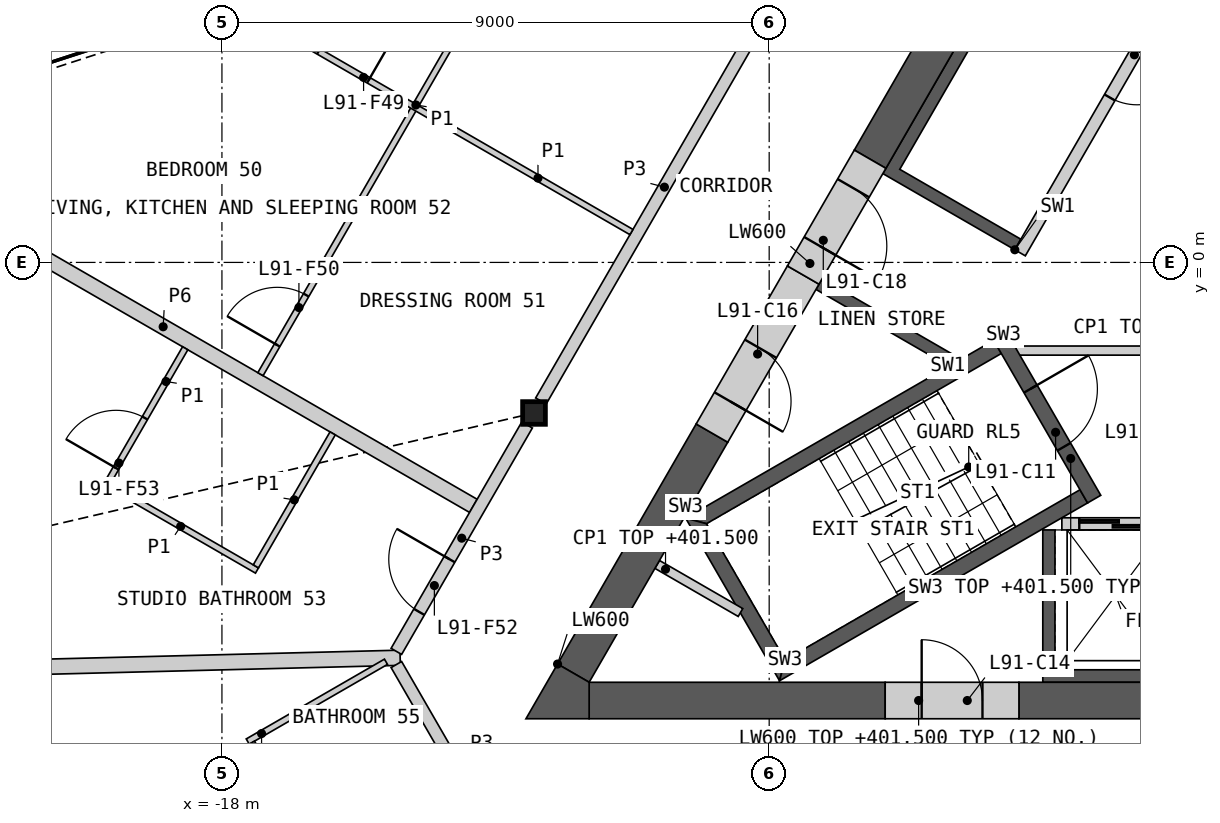
"""IFC4 building model, lengths in metres.
Left out: names, types, materials, properties, quantities, classifications, styles, units other than length and angle.
Written with IfcOpenShell. Run it as: python <this file> out.ifc"""

import sys

from ifc_helpers import new_model, si_unit, direction, frame, frame_2d, origin, origin_2d, place, context, subcontext, project, spatial, polyline, rectangle, i_section, outline, extrude, element, fill, save


model = new_model("IFC4")
c1 = context("Model", 3, precision=1e-05, world=origin(), true_north=direction((0.0, 1.0)))
c2 = subcontext(c1, "Body", "Model", "MODEL_VIEW")
j1 = project(units=[si_unit("LENGTHUNIT", "METRE"), si_unit("PLANEANGLEUNIT", "RADIAN")], contexts=[c1])
p1 = place(None, origin())
s1 = spatial("IfcSite", under=j1, at=p1, CompositionType="ELEMENT")
p2 = place(p1, origin())
s2 = spatial("IfcBuilding", under=s1, at=p2, CompositionType="ELEMENT")
p3 = place(p2, frame((0.0, 0.0, 398.4)))
s3 = spatial("IfcBuildingStorey", under=s2, at=p3, CompositionType="ELEMENT", Elevation=398.4)
p4 = place(p3, frame((-12.868, -2.476, 0.0), z_axis=(0.0, 0.0, 1.0), x_axis=(1.0, 0.0, 0.0)))
e1 = element("IfcColumn", 1, at=p4, inside=s3, PredefinedType="COLUMN", context=c2, shape_type="SweptSolid", body=[
    extrude(i_section(OverallWidth=0.374, OverallDepth=0.372, WebThickness=0.016, FlangeThickness=0.026, at=origin_2d()), origin(), (0.0, 0.0, 1.0), 3.4),
])
p5 = place(p3, origin())
e2 = element("IfcWall", 2, at=p5, inside=s3, PredefinedType="SHEAR", context=c2, shape_type="SweptSolid", body=[
    extrude(outline(polyline([(4.5, -4.4), (4.5, -6.906), (-4.5, -6.906), (-4.5, -4.4), (-4.3, -4.4), (-4.3, -6.7), (-2.3, -6.7), (-2.3, -4.4), (-2.1, -4.4), (-2.1, -6.7), (-0.1, -6.7), (-0.1, -4.4), (0.1, -4.4), (0.1, -6.7), (2.1, -6.7), (2.1, -4.4), (2.3, -4.4), (2.3, -6.7), (4.3, -6.7), (4.3, -4.4), (4.5, -4.4)])), origin(), (0.0, 0.0, 1.0), 3.1),
])
p6 = place(p3, frame((-4.187, -4.3, 0.0), z_axis=(0.0, 0.0, 1.0), x_axis=(1.0, 0.0, 0.0)))
e3 = element("IfcWall", 3, at=p6, inside=s3, PredefinedType="SOLIDWALL", context=c2, shape_type="SweptSolid", body=[
    extrude(rectangle(XDim=8.373, YDim=0.2, at=frame_2d((4.187, 0.0))), origin(), (0.0, 0.0, 1.0), 3.1),
])
p7 = place(p6, frame((0.287, 0.0, 0.0)))
e4 = element("IfcOpeningElement", 4, at=p7, cuts=e3, PredefinedType="OPENING", context=c2, shape_type="SweptSolid", body=[
    extrude(rectangle(XDim=1.2, YDim=2.1, at=frame_2d((0.6, 1.05))), frame((0.0, 0.11, 0.0), z_axis=(0.0, -1.0, 0.0), x_axis=(1.0, 0.0, 0.0)), (0.0, 0.0, 1.0), 0.22),
])
p8 = place(p6, frame((2.387, 0.0, 0.0)))
e5 = element("IfcOpeningElement", 5, at=p8, cuts=e3, PredefinedType="OPENING", context=c2, shape_type="SweptSolid", body=[
    extrude(rectangle(XDim=1.4, YDim=2.1, at=frame_2d((0.7, 1.05))), frame((0.0, 0.11, 0.0), z_axis=(0.0, -1.0, 0.0), x_axis=(1.0, 0.0, 0.0)), (0.0, 0.0, 1.0), 0.22),
])
p9 = place(p6, frame((4.737, 0.0, 0.0)))
e6 = element("IfcOpeningElement", 6, at=p9, cuts=e3, PredefinedType="OPENING", context=c2, shape_type="SweptSolid", body=[
    extrude(rectangle(XDim=1.1, YDim=2.1, at=frame_2d((0.55, 1.05))), frame((0.0, 0.11, 0.0), z_axis=(0.0, -1.0, 0.0), x_axis=(1.0, 0.0, 0.0)), (0.0, 0.0, 1.0), 0.22),
])
p10 = place(p6, frame((6.887, 0.0, 0.0)))
e7 = element("IfcOpeningElement", 7, at=p10, cuts=e3, PredefinedType="OPENING", context=c2, shape_type="SweptSolid", body=[
    extrude(rectangle(XDim=1.2, YDim=2.1, at=frame_2d((0.6, 1.05))), frame((0.0, 0.11, 0.0), z_axis=(0.0, -1.0, 0.0), x_axis=(1.0, 0.0, 0.0)), (0.0, 0.0, 1.0), 0.22),
])
p11 = place(p3, origin())
e8 = element("IfcWall", 8, at=p11, inside=s3, PredefinedType="SHEAR", context=c2, shape_type="SweptSolid", body=[
    extrude(outline(polyline([(-6.061, -1.697), (-8.231, -0.444), (-8.131, -0.271), (-5.96, -1.524), (-6.061, -1.697)])), origin(), (0.0, 0.0, 1.0), 3.1),
])
p12 = place(p3, origin())
e9 = element("IfcWall", 9, at=p12, inside=s3, PredefinedType="SHEAR", context=c2, shape_type="SweptSolid", body=[
    extrude(outline(polyline([(-4.96, 0.208), (-7.131, 1.461), (-3.731, 7.35), (-1.561, 6.097), (-1.66, 5.924), (-3.652, 7.074), (-6.852, 1.531), (-4.861, 0.381), (-4.96, 0.208)])), origin(), (0.0, 0.0, 1.0), 3.1),
])
p13 = place(p3, frame((-1.631, 5.776, 0.0), z_axis=(0.0, 0.0, 1.0), x_axis=(-0.499992876559, -0.866029516466, 0.0)))
e10 = element("IfcWall", 10, at=p13, inside=s3, PredefinedType="SOLIDWALL", context=c2, shape_type="SweptSolid", body=[
    extrude(rectangle(XDim=6.486, YDim=0.2, at=frame_2d((3.243, 0.0))), origin(), (0.0, 0.0, 1.0), 3.1),
])
p14 = place(p13, frame((2.637, 0.0, 0.0)))
e11 = element("IfcOpeningElement", 11, at=p14, cuts=e10, PredefinedType="OPENING", context=c2, shape_type="SweptSolid", body=[
    extrude(rectangle(XDim=0.9, YDim=2.1, at=frame_2d((0.45, 1.05))), frame((0.0, 0.11, 0.0), z_axis=(0.0, -1.0, 0.0), x_axis=(1.0, 0.0, 0.0)), (0.0, 0.0, 1.0), 0.22),
])
p15 = place(p3, frame((-4.941, -1.45, 0.0), z_axis=(0.0, 0.0, 1.0), x_axis=(1.0, 0.0, 0.0)))
e12 = element("IfcWall", 12, at=p15, inside=s3, PredefinedType="PARTITIONING", context=c2, shape_type="SweptSolid", body=[
    extrude(rectangle(XDim=9.882, YDim=0.15, at=frame_2d((4.941, 0.0))), origin(), (0.0, 0.0, 1.0), 3.1),
])
p16 = place(p15, frame((4.391, 0.0, 0.0)))
e13 = element("IfcOpeningElement", 13, at=p16, cuts=e12, PredefinedType="OPENING", context=c2, shape_type="SweptSolid", body=[
    extrude(rectangle(XDim=1.1, YDim=2.1, at=frame_2d((0.55, 1.05))), frame((0.0, 0.085, 0.0), z_axis=(0.0, -1.0, 0.0), x_axis=(1.0, 0.0, 0.0)), (0.0, 0.0, 1.0), 0.17),
])
p17 = place(p3, origin())
e14 = element("IfcWall", 14, at=p17, inside=s3, PredefinedType="SHEAR", context=c2, shape_type="SweptSolid", body=[
    extrude(outline(polyline([(-5.307, -1.281), (-10.374, -4.206), (-10.032, -4.298), (-5.182, -1.498), (-5.307, -1.281)])), origin(), (0.0, 0.0, 1.0), 3.1),
])
p18 = place(p3, origin())
e15 = element("IfcWall", 15, at=p18, inside=s3, PredefinedType="SHEAR", context=c2, shape_type="SweptSolid", body=[
    extrude(outline(polyline([(-10.374, -4.206), (-8.83, -6.881), (-8.738, -6.539), (-10.032, -4.298), (-10.374, -4.206)])), origin(), (0.0, 0.0, 1.0), 3.1),
])
p19 = place(p3, origin())
e16 = element("IfcWall", 16, at=p19, inside=s3, PredefinedType="SHEAR", context=c2, shape_type="SweptSolid", body=[
    extrude(outline(polyline([(-8.738, -6.539), (-8.83, -6.881), (-3.763, -3.956), (-3.888, -3.739), (-8.738, -6.539)])), origin(), (0.0, 0.0, 1.0), 3.1),
])
p20 = place(p3, frame((-5.199, -1.219, 0.0), z_axis=(0.0, 0.0, 1.0), x_axis=(0.499982516597, -0.866035497597, 0.0)))
e17 = element("IfcWall", 17, at=p20, inside=s3, PredefinedType="SHEAR", context=c2, shape_type="SweptSolid", body=[
    extrude(rectangle(XDim=3.088, YDim=0.25, at=frame_2d((1.544, 0.0))), origin(), (0.0, 0.0, 1.0), 3.1),
])
p21 = place(p20, frame((0.994, 0.0, 0.0)))
e18 = element("IfcOpeningElement", 18, at=p21, cuts=e17, PredefinedType="OPENING", context=c2, shape_type="SweptSolid", body=[
    extrude(rectangle(XDim=1.1, YDim=2.1, at=frame_2d((0.55, 1.05))), frame((0.0, 0.135, 0.0), z_axis=(0.0, -1.0, 0.0), x_axis=(1.0, 0.0, 0.0)), (0.0, 0.0, 1.0), 0.27),
])
p22 = place(p3, frame((-10.842, -4.967, 0.0), z_axis=(0.0, 0.0, 1.0), x_axis=(0.866098216386, -0.499873863663, 0.0)))
e19 = element("IfcWall", 19, at=p22, inside=s3, PredefinedType="PARTITIONING", context=c2, shape_type="SweptSolid", body=[
    extrude(rectangle(XDim=1.582, YDim=0.15, at=frame_2d((0.791, 0.0))), origin(), (0.0, 0.0, 1.0), 3.1),
])
p23 = place(p3, frame((-4.892, -7.206, 0.0), z_axis=(0.0, 0.0, 1.0), x_axis=(1.0, 0.0, 0.0)))
e20 = element("IfcWall", 20, at=p23, inside=s3, PredefinedType="SHEAR", context=c2, shape_type="SweptSolid", body=[
    extrude(rectangle(XDim=16.853, YDim=0.6, at=frame_2d((8.426, 0.0))), origin(), (0.0, 0.0, 1.0), 3.1),
])
p24 = place(p3, frame((-11.961, -7.206, 0.0), z_axis=(0.0, 0.0, 1.0), x_axis=(1.0, 0.0, 0.0)))
e21 = element("IfcWall", 21, at=p24, inside=s3, PredefinedType="SHEAR", context=c2, shape_type="SweptSolid", body=[
    extrude(rectangle(XDim=4.868, YDim=0.6, at=frame_2d((2.434, 0.0))), origin(), (0.0, 0.0, 1.0), 3.1),
])
p25 = place(p3, frame((-3.794, 7.84, 0.0), z_axis=(0.0, 0.0, 1.0), x_axis=(-0.499974747889, -0.866039982607, 0.0)))
e22 = element("IfcWall", 22, at=p25, inside=s3, PredefinedType="SHEAR", context=c2, shape_type="SweptSolid", body=[
    extrude(rectangle(XDim=7.092, YDim=0.6, at=frame_2d((3.546, 0.0))), origin(), (0.0, 0.0, 1.0), 3.1),
])
p26 = place(p3, frame((-9.941, -2.807, 0.0), z_axis=(0.0, 0.0, 1.0), x_axis=(-0.500020646047, -0.866013483456, 0.0)))
e23 = element("IfcWall", 23, at=p26, inside=s3, PredefinedType="SHEAR", context=c2, shape_type="SweptSolid", body=[
    extrude(rectangle(XDim=4.559, YDim=0.6, at=frame_2d((2.28, 0.0))), origin(), (0.0, 0.0, 1.0), 3.1),
])
p27 = place(p3, origin())
e24 = element("IfcWall", 24, at=p27, inside=s3, PredefinedType="SHEAR", context=c2, shape_type="SweptSolid", body=[
    extrude(outline(polyline([(-12.48, -6.606), (-11.961, -6.906), (-11.961, -7.506), (-13.0, -7.506), (-12.48, -6.606)])), origin(), (0.0, 0.0, 1.0), 3.1),
])
p28 = place(p3, frame((-7.092, -7.206, 0.0), z_axis=(0.0, 0.0, 1.0), x_axis=(1.0, 0.0, 0.0)))
e25 = element("IfcWall", 25, at=p28, inside=s3, PredefinedType="SHEAR", context=c2, shape_type="SweptSolid", body=[
    extrude(rectangle(XDim=2.2, YDim=0.6, at=frame_2d((1.1, 0.0))), origin(), (0.0, 0.0, 1.0), 3.1),
])
p29 = place(p28, frame((0.6, 0.0, 0.0)))
e26 = element("IfcOpeningElement", 26, at=p29, cuts=e25, PredefinedType="OPENING", context=c2, shape_type="SweptSolid", body=[
    extrude(rectangle(XDim=1.0, YDim=2.1, at=frame_2d((0.5, 1.05))), frame((0.0, 0.31, 0.0), z_axis=(0.0, -1.0, 0.0), x_axis=(1.0, 0.0, 0.0)), (0.0, 0.0, 1.0), 0.62),
])
p30 = place(p3, frame((-8.44, -0.208, 0.0), z_axis=(0.0, 0.0, 1.0), x_axis=(-0.499997052475, -0.866027105532, 0.0)))
e27 = element("IfcWall", 27, at=p30, inside=s3, PredefinedType="SHEAR", context=c2, shape_type="SweptSolid", body=[
    extrude(rectangle(XDim=3.001, YDim=0.6, at=frame_2d((1.501, 0.0))), origin(), (0.0, 0.0, 1.0), 3.1),
])
p31 = place(p30, frame((1.4, 0.0, 0.0)))
e28 = element("IfcOpeningElement", 28, at=p31, cuts=e27, PredefinedType="OPENING", context=c2, shape_type="SweptSolid", body=[
    extrude(rectangle(XDim=1.0, YDim=2.1, at=frame_2d((0.5, 1.05))), frame((0.0, 0.31, 0.0), z_axis=(0.0, -1.0, 0.0), x_axis=(1.0, 0.0, 0.0)), (0.0, 0.0, 1.0), 0.62),
])
p32 = place(p3, frame((-7.34, 1.698, 0.0), z_axis=(0.0, 0.0, 1.0), x_axis=(-0.50002983664, -0.866008176907, 0.0)))
e29 = element("IfcWall", 29, at=p32, inside=s3, PredefinedType="SHEAR", context=c2, shape_type="SweptSolid", body=[
    extrude(rectangle(XDim=2.2, YDim=0.6, at=frame_2d((1.1, 0.0))), origin(), (0.0, 0.0, 1.0), 3.1),
])
p33 = place(p32, frame((0.55, 0.0, 0.0)))
e30 = element("IfcOpeningElement", 30, at=p33, cuts=e29, PredefinedType="OPENING", context=c2, shape_type="SweptSolid", body=[
    extrude(rectangle(XDim=1.1, YDim=2.1, at=frame_2d((0.55, 1.05))), frame((0.0, 0.31, 0.0), z_axis=(0.0, -1.0, 0.0), x_axis=(1.0, 0.0, 0.0)), (0.0, 0.0, 1.0), 0.62),
])
p34 = place(p3, frame((-29.269, -6.862, 0.0), z_axis=(0.0, 0.0, 1.0), x_axis=(0.999679020594, 0.025334872878, 0.0)))
e31 = element("IfcWall", 31, at=p34, inside=s3, PredefinedType="PARTITIONING", context=c2, shape_type="SweptSolid", body=[
    extrude(rectangle(XDim=14.204, YDim=0.25, at=frame_2d((7.102, 0.0))), origin(), (0.0, 0.0, 1.0), 2.33),
])
p35 = place(p3, frame((-24.069, 1.887, 0.0), z_axis=(0.0, 0.0, 1.0), x_axis=(0.866023404247, -0.500003463284, 0.0)))
e32 = element("IfcWall", 32, at=p35, inside=s3, PredefinedType="PARTITIONING", context=c2, shape_type="SweptSolid", body=[
    extrude(rectangle(XDim=11.782, YDim=0.25, at=frame_2d((5.891, 0.0))), origin(), (0.0, 0.0, 1.0), 2.33),
])
p36 = place(p3, frame((-12.754, -2.279, 0.0), z_axis=(0.0, 0.0, 1.0), x_axis=(0.500001682468, 0.866024432409, 0.0)))
e33 = element("IfcWall", 33, at=p36, inside=s3, PredefinedType="PARTITIONING", context=c2, shape_type="SweptSolid", body=[
    extrude(rectangle(XDim=8.124, YDim=0.2, at=frame_2d((4.062, 0.0))), origin(), (0.0, 0.0, 1.0), 3.1),
])
p37 = place(p3, frame((-15.131, -6.397, 0.0), z_axis=(0.0, 0.0, 1.0), x_axis=(0.499986217557, 0.866033360935, 0.0)))
e34 = element("IfcWall", 34, at=p37, inside=s3, PredefinedType="PARTITIONING", context=c2, shape_type="SweptSolid", body=[
    extrude(rectangle(XDim=4.3, YDim=0.2, at=frame_2d((2.15, 0.0))), origin(), (0.0, 0.0, 1.0), 3.1),
])
p38 = place(p37, frame((0.75, 0.0, 0.0)))
e35 = element("IfcOpeningElement", 35, at=p38, cuts=e34, PredefinedType="OPENING", context=c2, shape_type="SweptSolid", body=[
    extrude(rectangle(XDim=1.0, YDim=2.1, at=frame_2d((0.5, 1.05))), frame((0.0, 0.11, 0.0), z_axis=(0.0, -1.0, 0.0), x_axis=(1.0, 0.0, 0.0)), (0.0, 0.0, 1.0), 0.22),
])
p39 = place(p3, frame((-15.131, -6.614, 0.0), z_axis=(0.0, 0.0, 1.0), x_axis=(0.499967746641, -0.866044024469, 0.0)))
e36 = element("IfcWall", 36, at=p39, inside=s3, PredefinedType="PARTITIONING", context=c2, shape_type="SweptSolid", body=[
    extrude(rectangle(XDim=3.676, YDim=0.2, at=frame_2d((1.838, 0.0))), origin(), (0.0, 0.0, 1.0), 3.1),
])
p40 = place(p39, frame((2.426, 0.0, 0.0)))
e37 = element("IfcOpeningElement", 37, at=p40, cuts=e36, PredefinedType="OPENING", context=c2, shape_type="SweptSolid", body=[
    extrude(rectangle(XDim=1.0, YDim=2.1, at=frame_2d((0.5, 1.05))), frame((0.0, 0.11, 0.0), z_axis=(0.0, -1.0, 0.0), x_axis=(1.0, 0.0, 0.0)), (0.0, 0.0, 1.0), 0.22),
])
p41 = place(p3, frame((-17.366, -1.838, 0.0), z_axis=(0.0, 0.0, 1.0), x_axis=(0.499998717582, 0.866026144187, 0.0)))
e38 = element("IfcWall", 38, at=p41, inside=s3, PredefinedType="PARTITIONING", context=c2, shape_type="SweptSolid", body=[
    extrude(rectangle(XDim=10.225, YDim=0.1, at=frame_2d((5.113, 0.0))), origin(), (0.0, 0.0, 1.0), 2.33),
])
p42 = place(p41, frame((6.907, 0.0, 0.0)))
e39 = element("IfcOpeningElement", 39, at=p42, cuts=e38, PredefinedType="OPENING", context=c2, shape_type="SweptSolid", body=[
    extrude(rectangle(XDim=0.95, YDim=2.1, at=frame_2d((0.475, 1.05))), frame((0.0, 0.06, 0.0), z_axis=(0.0, -1.0, 0.0), x_axis=(1.0, 0.0, 0.0)), (0.0, 0.0, 1.0), 0.12),
])
p43 = place(p41, frame((0.552, 0.0, 0.0)))
e40 = element("IfcOpeningElement", 40, at=p43, cuts=e38, PredefinedType="OPENING", context=c2, shape_type="SweptSolid", body=[
    extrude(rectangle(XDim=0.95, YDim=2.1, at=frame_2d((0.475, 1.05))), frame((0.0, 0.06, 0.0), z_axis=(0.0, -1.0, 0.0), x_axis=(1.0, 0.0, 0.0)), (0.0, 0.0, 1.0), 0.12),
])
p44 = place(p3, frame((-17.414, 4.049, 0.0), z_axis=(0.0, 0.0, 1.0), x_axis=(0.866033839264, -0.499985389037, 0.0)))
e41 = element("IfcWall", 41, at=p44, inside=s3, PredefinedType="PARTITIONING", context=c2, shape_type="SweptSolid", body=[
    extrude(rectangle(XDim=7.1, YDim=0.1, at=frame_2d((3.55, 0.0))), origin(), (0.0, 0.0, 1.0), 2.33),
])
p45 = place(p44, frame((1.158, 0.0, 0.0)))
e42 = element("IfcOpeningElement", 42, at=p45, cuts=e41, PredefinedType="OPENING", context=c2, shape_type="SweptSolid", body=[
    extrude(rectangle(XDim=0.95, YDim=2.1, at=frame_2d((0.475, 1.05))), frame((0.0, 0.06, 0.0), z_axis=(0.0, -1.0, 0.0), x_axis=(1.0, 0.0, 0.0)), (0.0, 0.0, 1.0), 0.12),
])
p46 = place(p3, frame((-19.935, -3.617, 0.0), z_axis=(0.0, 0.0, 1.0), x_axis=(0.866032775405, -0.499987231761, 0.0)))
e43 = element("IfcWall", 43, at=p46, inside=s3, PredefinedType="PARTITIONING", context=c2, shape_type="SweptSolid", body=[
    extrude(rectangle(XDim=2.9, YDim=0.1, at=frame_2d((1.45, 0.0))), origin(), (0.0, 0.0, 1.0), 2.33),
])
p47 = place(p3, frame((-17.442, -4.999, 0.0), z_axis=(0.0, 0.0, 1.0), x_axis=(0.499976333282, 0.866039067339, 0.0)))
e44 = element("IfcWall", 44, at=p47, inside=s3, PredefinedType="PARTITIONING", context=c2, shape_type="SweptSolid", body=[
    extrude(rectangle(XDim=2.525, YDim=0.1, at=frame_2d((1.262, 0.0))), origin(), (0.0, 0.0, 1.0), 2.33),
])
p48 = place(p3, frame((-19.867, -3.599, 0.0), z_axis=(0.0, 0.0, 1.0), x_axis=(0.500048846702, 0.865997200291, 0.0)))
e45 = element("IfcWall", 45, at=p48, inside=s3, PredefinedType="PARTITIONING", context=c2, shape_type="SweptSolid", body=[
    extrude(rectangle(XDim=2.525, YDim=0.1, at=frame_2d((1.263, 0.0))), origin(), (0.0, 0.0, 1.0), 2.33),
])
p49 = place(p48, frame((0.25, 0.0, 0.0)))
e46 = element("IfcOpeningElement", 46, at=p49, cuts=e45, PredefinedType="OPENING", context=c2, shape_type="SweptSolid", body=[
    extrude(rectangle(XDim=0.95, YDim=2.1, at=frame_2d((0.475, 1.05))), frame((0.0, 0.06, 0.0), z_axis=(0.0, -1.0, 0.0), x_axis=(1.0, 0.0, 0.0)), (0.0, 0.0, 1.0), 0.12),
])
p50 = place(p3, frame((-17.575, -7.881, 0.0), z_axis=(0.0, 0.0, 1.0), x_axis=(0.866013657776, 0.500020344131, 0.0)))
e47 = element("IfcWall", 47, at=p50, inside=s3, PredefinedType="PARTITIONING", context=c2, shape_type="SweptSolid", body=[
    extrude(rectangle(XDim=2.625, YDim=0.1, at=frame_2d((1.312, 0.0))), origin(), (0.0, 0.0, 1.0), 2.33),
])
p51 = place(p3, frame((-17.507, -7.899, 0.0), z_axis=(0.0, 0.0, 1.0), x_axis=(0.499972416139, -0.866041328748, 0.0)))
e48 = element("IfcWall", 48, at=p51, inside=s3, PredefinedType="PARTITIONING", context=c2, shape_type="SweptSolid", body=[
    extrude(rectangle(XDim=1.973, YDim=0.1, at=frame_2d((0.986, 0.0))), origin(), (0.0, 0.0, 1.0), 2.33),
])
p52 = place(p7, origin())
e49 = element("IfcDoor", 49, at=p52, inside=s3, OperationType="SLIDING_TO_LEFT", PredefinedType="DOOR", context=c2, shape_type="SweptSolid", body=[
    extrude(rectangle(XDim=1.2, YDim=2.1, at=frame_2d((0.6, 1.05))), frame((0.0, 0.025, 0.0), z_axis=(0.0, -1.0, 0.0), x_axis=(1.0, 0.0, 0.0)), (0.0, 0.0, 1.0), 0.05),
])
fill(e4, e49)
p53 = place(p14, origin())
e50 = element("IfcDoor", 50, at=p53, inside=s3, OperationType="SINGLE_SWING_LEFT", PredefinedType="DOOR", context=c2, shape_type="SweptSolid", body=[
    extrude(rectangle(XDim=0.9, YDim=2.1, at=frame_2d((0.45, 1.05))), frame((0.0, 0.025, 0.0), z_axis=(0.0, -1.0, 0.0), x_axis=(1.0, 0.0, 0.0)), (0.0, 0.0, 1.0), 0.05),
])
fill(e11, e50)
p54 = place(p21, origin())
e51 = element("IfcDoor", 51, at=p54, inside=s3, OperationType="SINGLE_SWING_LEFT", PredefinedType="DOOR", context=c2, shape_type="SweptSolid", body=[
    extrude(rectangle(XDim=1.1, YDim=2.1, at=frame_2d((0.55, 1.05))), frame((0.0, 0.025, 0.0), z_axis=(0.0, -1.0, 0.0), x_axis=(1.0, 0.0, 0.0)), (0.0, 0.0, 1.0), 0.05),
])
fill(e18, e51)
p55 = place(p29, origin())
e52 = element("IfcDoor", 52, at=p55, inside=s3, OperationType="SINGLE_SWING_LEFT", PredefinedType="DOOR", context=c2, shape_type="SweptSolid", body=[
    extrude(rectangle(XDim=1.0, YDim=2.1, at=frame_2d((0.5, 1.05))), frame((0.0, 0.055, 0.0), z_axis=(0.0, -1.0, 0.0), x_axis=(1.0, 0.0, 0.0)), (0.0, 0.0, 1.0), 0.05),
])
fill(e26, e52)
p56 = place(p31, origin())
e53 = element("IfcDoor", 53, at=p56, inside=s3, OperationType="SINGLE_SWING_RIGHT", PredefinedType="DOOR", context=c2, shape_type="SweptSolid", body=[
    extrude(rectangle(XDim=1.0, YDim=2.1, at=frame_2d((0.5, 1.05))), frame((0.0, 0.055, 0.0), z_axis=(0.0, -1.0, 0.0), x_axis=(1.0, 0.0, 0.0)), (0.0, 0.0, 1.0), 0.05),
])
fill(e28, e53)
p57 = place(p33, origin())
e54 = element("IfcDoor", 54, at=p57, inside=s3, OperationType="SINGLE_SWING_RIGHT", PredefinedType="DOOR", context=c2, shape_type="SweptSolid", body=[
    extrude(rectangle(XDim=1.1, YDim=2.1, at=frame_2d((0.55, 1.05))), frame((0.0, 0.055, 0.0), z_axis=(0.0, -1.0, 0.0), x_axis=(1.0, 0.0, 0.0)), (0.0, 0.0, 1.0), 0.05),
])
fill(e30, e54)
p58 = place(p45, origin())
e55 = element("IfcDoor", 55, at=p58, inside=s3, OperationType="SINGLE_SWING_RIGHT", PredefinedType="DOOR", context=c2, shape_type="SweptSolid", body=[
    extrude(rectangle(XDim=0.95, YDim=2.1, at=frame_2d((0.475, 1.05))), frame((0.0, 0.025, 0.0), z_axis=(0.0, -1.0, 0.0), x_axis=(1.0, 0.0, 0.0)), (0.0, 0.0, 1.0), 0.05),
])
fill(e42, e55)
p59 = place(p43, origin())
e56 = element("IfcDoor", 56, at=p59, inside=s3, OperationType="SINGLE_SWING_LEFT", PredefinedType="DOOR", context=c2, shape_type="SweptSolid", body=[
    extrude(rectangle(XDim=0.95, YDim=2.1, at=frame_2d((0.475, 1.05))), frame((0.0, 0.025, 0.0), z_axis=(0.0, -1.0, 0.0), x_axis=(1.0, 0.0, 0.0)), (0.0, 0.0, 1.0), 0.05),
])
fill(e40, e56)
p60 = place(p38, origin())
e57 = element("IfcDoor", 57, at=p60, inside=s3, OperationType="SINGLE_SWING_RIGHT", PredefinedType="DOOR", context=c2, shape_type="SweptSolid", body=[
    extrude(rectangle(XDim=1.0, YDim=2.1, at=frame_2d((0.5, 1.05))), frame((0.0, 0.025, 0.0), z_axis=(0.0, -1.0, 0.0), x_axis=(1.0, 0.0, 0.0)), (0.0, 0.0, 1.0), 0.05),
])
fill(e35, e57)
p61 = place(p49, origin())
e58 = element("IfcDoor", 58, at=p61, inside=s3, OperationType="SINGLE_SWING_LEFT", PredefinedType="DOOR", context=c2, shape_type="SweptSolid", body=[
    extrude(rectangle(XDim=0.95, YDim=2.1, at=frame_2d((0.475, 1.05))), frame((0.0, 0.025, 0.0), z_axis=(0.0, -1.0, 0.0), x_axis=(1.0, 0.0, 0.0)), (0.0, 0.0, 1.0), 0.05),
])
fill(e46, e58)
save(model, sys.argv[1])
